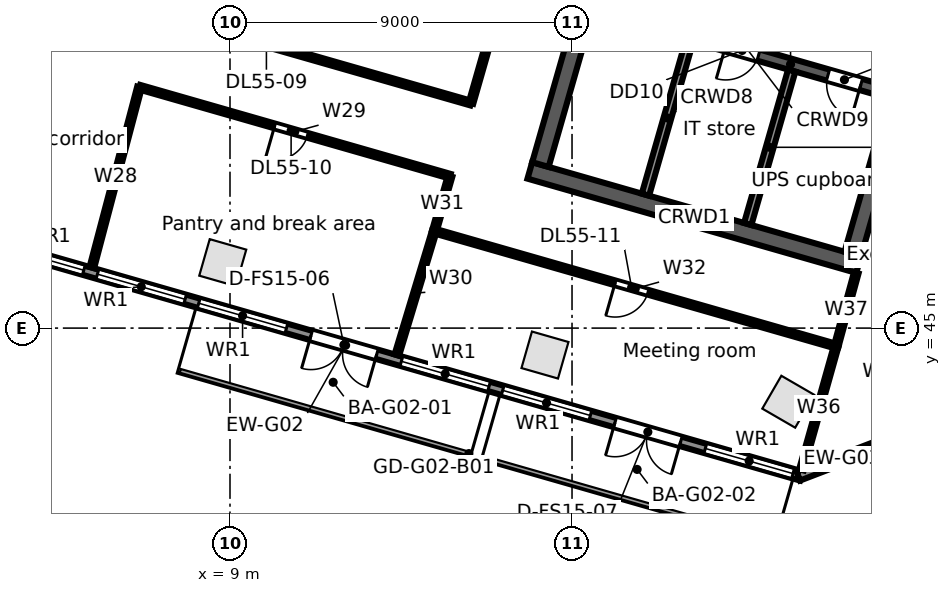
"""IFC4 building model, lengths in metres.
Left out: names, types, materials, properties, quantities, classifications, styles, units other than length and angle.
Written with IfcOpenShell. Run it as: python <this file> out.ifc"""

import sys

from ifc_helpers import new_model, si_unit, direction, frame, frame_2d, origin, origin_2d, place, context, subcontext, project, spatial, rectangle, extrude, element, fill, save


model = new_model("IFC4")
c1 = context("Model", 3, precision=1e-05, world=origin(), true_north=direction((0.0, 1.0)))
c2 = subcontext(c1, "Body", "Model", "MODEL_VIEW")
j1 = project(units=[si_unit("LENGTHUNIT", "METRE"), si_unit("PLANEANGLEUNIT", "RADIAN")], contexts=[c1])
p1 = place(None, origin())
s1 = spatial("IfcSite", under=j1, at=p1, CompositionType="ELEMENT")
p2 = place(p1, origin())
s2 = spatial("IfcBuilding", under=s1, at=p2, CompositionType="ELEMENT")
p3 = place(p2, frame((0.0, 0.0, 254.3)))
s3 = spatial("IfcBuildingStorey", under=s2, at=p3, CompositionType="ELEMENT", Elevation=254.3)
for number, where, z_axis, x_axis in (
    (1, (8.81, 46.722, 0.0), (0.0, 0.0, 1.0), (0.961, -0.276, 0.0)),
    (2, (17.288, 44.291, 0.0), (0.0, 0.0, 1.0), (0.961, -0.276, 0.0)),
    (3, (23.69, 43.063, 0.0), (0.0, 0.0, 1.0), (-0.865, 0.501, 0.0)),
):
    element("IfcColumn", number, at=place(p3, frame(where, z_axis=z_axis, x_axis=x_axis)), inside=s3, PredefinedType="COLUMN", context=c2, shape_type="SweptSolid", body=[
        extrude(rectangle(XDim=1.0, YDim=1.0, at=origin_2d()), origin(), (0.0, 0.0, 1.0), 3.9),
    ])
p4 = place(p3, frame((24.034, 41.108, 0.0), z_axis=(0.0, 0.0, 1.0), x_axis=(-0.96126060691, 0.275641153683, 0.0)))
e4 = element("IfcWall", 4, at=p4, inside=s3, PredefinedType="STANDARD", context=c2, shape_type="SweptSolid", body=[
    extrude(rectangle(XDim=24.951, YDim=0.25, at=frame_2d((12.475, 0.0))), origin(), (0.0, 0.0, 1.0), 3.55),
])
p5 = place(p4, frame((22.416, 0.0, 0.8)))
e5 = element("IfcOpeningElement", 5, at=p5, cuts=e4, PredefinedType="OPENING", context=c2, shape_type="SweptSolid", body=[
    extrude(rectangle(XDim=2.4, YDim=2.2, at=frame_2d((1.2, 1.1))), frame((0.0, 0.135, 0.0), z_axis=(0.0, -1.0, 0.0), x_axis=(1.0, 0.0, 0.0)), (0.0, 0.0, 1.0), 0.27),
])
p6 = place(p4, frame((19.643, 0.0, 0.8)))
e6 = element("IfcOpeningElement", 6, at=p6, cuts=e4, PredefinedType="OPENING", context=c2, shape_type="SweptSolid", body=[
    extrude(rectangle(XDim=2.4, YDim=2.2, at=frame_2d((1.2, 1.1))), frame((0.0, 0.135, 0.0), z_axis=(0.0, -1.0, 0.0), x_axis=(1.0, 0.0, 0.0)), (0.0, 0.0, 1.0), 0.27),
])
p7 = place(p4, frame((16.869, 0.0, 0.8)))
e7 = element("IfcOpeningElement", 7, at=p7, cuts=e4, PredefinedType="OPENING", context=c2, shape_type="SweptSolid", body=[
    extrude(rectangle(XDim=2.4, YDim=2.2, at=frame_2d((1.2, 1.1))), frame((0.0, 0.135, 0.0), z_axis=(0.0, -1.0, 0.0), x_axis=(1.0, 0.0, 0.0)), (0.0, 0.0, 1.0), 0.27),
])
p8 = place(p4, frame((14.096, 0.0, 0.8)))
e8 = element("IfcOpeningElement", 8, at=p8, cuts=e4, PredefinedType="OPENING", context=c2, shape_type="SweptSolid", body=[
    extrude(rectangle(XDim=2.4, YDim=2.2, at=frame_2d((1.2, 1.1))), frame((0.0, 0.135, 0.0), z_axis=(0.0, -1.0, 0.0), x_axis=(1.0, 0.0, 0.0)), (0.0, 0.0, 1.0), 0.27),
])
p9 = place(p4, frame((11.622, 0.0, 0.0)))
e9 = element("IfcOpeningElement", 9, at=p9, cuts=e4, PredefinedType="OPENING", context=c2, shape_type="SweptSolid", body=[
    extrude(rectangle(XDim=1.8, YDim=2.4, at=frame_2d((0.9, 1.2))), frame((0.0, 0.135, 0.0), z_axis=(0.0, -1.0, 0.0), x_axis=(1.0, 0.0, 0.0)), (0.0, 0.0, 1.0), 0.27),
])
p10 = place(p4, frame((8.549, 0.0, 0.8)))
e10 = element("IfcOpeningElement", 10, at=p10, cuts=e4, PredefinedType="OPENING", context=c2, shape_type="SweptSolid", body=[
    extrude(rectangle(XDim=2.4, YDim=2.2, at=frame_2d((1.2, 1.1))), frame((0.0, 0.135, 0.0), z_axis=(0.0, -1.0, 0.0), x_axis=(1.0, 0.0, 0.0)), (0.0, 0.0, 1.0), 0.27),
])
p11 = place(p4, frame((5.775, 0.0, 0.8)))
e11 = element("IfcOpeningElement", 11, at=p11, cuts=e4, PredefinedType="OPENING", context=c2, shape_type="SweptSolid", body=[
    extrude(rectangle(XDim=2.4, YDim=2.2, at=frame_2d((1.2, 1.1))), frame((0.0, 0.135, 0.0), z_axis=(0.0, -1.0, 0.0), x_axis=(1.0, 0.0, 0.0)), (0.0, 0.0, 1.0), 0.27),
])
p12 = place(p4, frame((3.302, 0.0, 0.0)))
e12 = element("IfcOpeningElement", 12, at=p12, cuts=e4, PredefinedType="OPENING", context=c2, shape_type="SweptSolid", body=[
    extrude(rectangle(XDim=1.8, YDim=2.4, at=frame_2d((0.9, 1.2))), frame((0.0, 0.135, 0.0), z_axis=(0.0, -1.0, 0.0), x_axis=(1.0, 0.0, 0.0)), (0.0, 0.0, 1.0), 0.27),
])
p13 = place(p4, frame((0.229, 0.0, 0.8)))
e13 = element("IfcOpeningElement", 13, at=p13, cuts=e4, PredefinedType="OPENING", context=c2, shape_type="SweptSolid", body=[
    extrude(rectangle(XDim=2.4, YDim=2.2, at=frame_2d((1.2, 1.1))), frame((0.0, 0.135, 0.0), z_axis=(0.0, -1.0, 0.0), x_axis=(1.0, 0.0, 0.0)), (0.0, 0.0, 1.0), 0.27),
])
p14 = place(p3, frame((26.27, 41.993, 0.0), z_axis=(0.0, 0.0, 1.0), x_axis=(-0.933573798066, -0.358385216722, 0.0)))
e14 = element("IfcWall", 14, at=p14, inside=s3, PredefinedType="STANDARD", context=c2, shape_type="SweptSolid", body=[
    extrude(rectangle(XDim=2.48, YDim=0.25, at=frame_2d((1.24, 0.0))), origin(), (0.0, 0.0, 1.0), 3.55),
])
p15 = place(p3, frame((16.89, 49.149, 0.0), z_axis=(0.0, 0.0, 1.0), x_axis=(0.96126248289, -0.275634611374, 0.0)))
e15 = element("IfcWall", 15, at=p15, inside=s3, PredefinedType="SOLIDWALL", context=c2, shape_type="SweptSolid", body=[
    extrude(rectangle(XDim=9.0, YDim=0.45, at=frame_2d((4.5, 0.0))), origin(), (0.0, 0.0, 1.0), 3.55),
])
p16 = place(p3, frame((21.131, 52.692, 0.0), z_axis=(0.0, 0.0, 1.0), x_axis=(0.961261488075, -0.275638080722, 0.0)))
e16 = element("IfcWall", 16, at=p16, inside=s3, PredefinedType="SOLIDWALL", context=c2, shape_type="SweptSolid", body=[
    extrude(rectangle(XDim=5.45, YDim=0.3, at=frame_2d((2.725, 0.0))), origin(), (0.0, 0.0, 1.0), 3.55),
])
p17 = place(p16, frame((0.95, 0.0, 0.0)))
e17 = element("IfcOpeningElement", 17, at=p17, cuts=e16, PredefinedType="OPENING", context=c2, shape_type="SweptSolid", body=[
    extrude(rectangle(XDim=0.9, YDim=2.1, at=frame_2d((0.45, 1.05))), frame((0.0, 0.16, 0.0), z_axis=(0.0, -1.0, 0.0), x_axis=(1.0, 0.0, 0.0)), (0.0, 0.0, 1.0), 0.32),
])
p18 = place(p16, frame((3.75, 0.0, 0.0)))
e18 = element("IfcOpeningElement", 18, at=p18, cuts=e16, PredefinedType="OPENING", context=c2, shape_type="SweptSolid", body=[
    extrude(rectangle(XDim=0.9, YDim=2.1, at=frame_2d((0.45, 1.05))), frame((0.0, 0.16, 0.0), z_axis=(0.0, -1.0, 0.0), x_axis=(1.0, 0.0, 0.0)), (0.0, 0.0, 1.0), 0.32),
])
p19 = place(p3, frame((17.168, 49.303, 0.0), z_axis=(0.0, 0.0, 1.0), x_axis=(0.275638974822, 0.961261231695, 0.0)))
e19 = element("IfcWall", 19, at=p19, inside=s3, PredefinedType="SOLIDWALL", context=c2, shape_type="SweptSolid", body=[
    extrude(rectangle(XDim=11.1, YDim=0.45, at=frame_2d((5.55, 0.0))), origin(), (0.0, 0.0, 1.0), 3.55),
])
p20 = place(p19, frame((4.95, 0.0, 0.0)))
e20 = element("IfcOpeningElement", 20, at=p20, cuts=e19, PredefinedType="OPENING", context=c2, shape_type="SweptSolid", body=[
    extrude(rectangle(XDim=1.2, YDim=2.1, at=frame_2d((0.6, 1.05))), frame((0.0, 0.235, 0.0), z_axis=(0.0, -1.0, 0.0), x_axis=(1.0, 0.0, 0.0)), (0.0, 0.0, 1.0), 0.47),
])
p21 = place(p3, frame((19.932, 48.511, 0.0), z_axis=(0.0, 0.0, 1.0), x_axis=(0.275642273411, 0.961260285827, 0.0)))
e21 = element("IfcWall", 21, at=p21, inside=s3, PredefinedType="SOLIDWALL", context=c2, shape_type="SweptSolid", body=[
    extrude(rectangle(XDim=4.2, YDim=0.2, at=frame_2d((2.1, 0.0))), origin(), (0.0, 0.0, 1.0), 3.55),
])
p22 = place(p3, frame((22.623, 47.739, 0.0), z_axis=(0.0, 0.0, 1.0), x_axis=(0.275642273411, 0.961260285827, 0.0)))
e22 = element("IfcWall", 22, at=p22, inside=s3, PredefinedType="PARTITIONING", context=c2, shape_type="SweptSolid", body=[
    extrude(rectangle(XDim=4.2, YDim=0.2, at=frame_2d((2.1, 0.0))), origin(), (0.0, 0.0, 1.0), 3.55),
])
p23 = place(p3, frame((25.387, 46.947, 0.0), z_axis=(0.0, 0.0, 1.0), x_axis=(0.275638974822, 0.961261231695, 0.0)))
e23 = element("IfcWall", 23, at=p23, inside=s3, PredefinedType="SOLIDWALL", context=c2, shape_type="SweptSolid", body=[
    extrude(rectangle(XDim=11.1, YDim=0.45, at=frame_2d((5.55, 0.0))), origin(), (0.0, 0.0, 1.0), 3.55),
])
p24 = place(p23, frame((4.95, 0.0, 0.0)))
e24 = element("IfcOpeningElement", 24, at=p24, cuts=e23, PredefinedType="OPENING", context=c2, shape_type="SweptSolid", body=[
    extrude(rectangle(XDim=1.2, YDim=2.1, at=frame_2d((0.6, 1.05))), frame((0.0, 0.235, 0.0), z_axis=(0.0, -1.0, 0.0), x_axis=(1.0, 0.0, 0.0)), (0.0, 0.0, 1.0), 0.47),
])
p25 = place(p3, frame((4.527, 54.02, 0.0), z_axis=(0.0, 0.0, 1.0), x_axis=(0.961279520283, -0.275575187352, 0.0)))
e25 = element("IfcWall", 25, at=p25, inside=s3, PredefinedType="PARTITIONING", context=c2, shape_type="SweptSolid", body=[
    extrude(rectangle(XDim=11.25, YDim=0.125, at=frame_2d((5.625, 0.0))), origin(), (0.0, 0.0, 1.0), 2.618),
])
p26 = place(p25, frame((5.2, 0.0, 0.0)))
e26 = element("IfcOpeningElement", 26, at=p26, cuts=e25, PredefinedType="OPENING", context=c2, shape_type="SweptSolid", body=[
    extrude(rectangle(XDim=0.9, YDim=2.1, at=frame_2d((0.45, 1.05))), frame((0.0, 0.073, 0.0), z_axis=(0.0, -1.0, 0.0), x_axis=(1.0, 0.0, 0.0)), (0.0, 0.0, 1.0), 0.145),
])
p27 = place(p3, frame((5.364, 46.592, 0.0), z_axis=(0.0, 0.0, 1.0), x_axis=(0.255520885185, 0.966803536006, 0.0)))
e27 = element("IfcWall", 27, at=p27, inside=s3, PredefinedType="PARTITIONING", context=c2, shape_type="SweptSolid", body=[
    extrude(rectangle(XDim=4.911, YDim=0.125, at=frame_2d((2.456, 0.0))), origin(), (0.0, 0.0, 1.0), 2.73),
])
p28 = place(p3, frame((6.619, 51.34, 0.0), z_axis=(0.0, 0.0, 1.0), x_axis=(0.961262314742, -0.275635197782, 0.0)))
e28 = element("IfcWall", 28, at=p28, inside=s3, PredefinedType="PARTITIONING", context=c2, shape_type="SweptSolid", body=[
    extrude(rectangle(XDim=8.5, YDim=0.125, at=frame_2d((4.25, 0.0))), origin(), (0.0, 0.0, 1.0), 2.618),
])
p29 = place(p28, frame((3.7, 0.0, 0.0)))
e29 = element("IfcOpeningElement", 29, at=p29, cuts=e28, PredefinedType="OPENING", context=c2, shape_type="SweptSolid", body=[
    extrude(rectangle(XDim=0.9, YDim=2.1, at=frame_2d((0.45, 1.05))), frame((0.0, 0.073, 0.0), z_axis=(0.0, -1.0, 0.0), x_axis=(1.0, 0.0, 0.0)), (0.0, 0.0, 1.0), 0.145),
])
p30 = place(p3, frame((13.39, 44.29, 0.0), z_axis=(0.0, 0.0, 1.0), x_axis=(0.289389501276, 0.957211427299, 0.0)))
e30 = element("IfcWall", 30, at=p30, inside=s3, PredefinedType="PARTITIONING", context=c2, shape_type="SweptSolid", body=[
    extrude(rectangle(XDim=3.411, YDim=0.125, at=frame_2d((1.706, 0.0))), origin(), (0.0, 0.0, 1.0), 2.73),
])
p31 = place(p3, frame((14.377, 47.555, 0.0), z_axis=(0.0, 0.0, 1.0), x_axis=(0.275365908, 0.961339490873, 0.0)))
e31 = element("IfcWall", 31, at=p31, inside=s3, PredefinedType="PARTITIONING", context=c2, shape_type="SweptSolid", body=[
    extrude(rectangle(XDim=1.5, YDim=0.125, at=frame_2d((0.75, 0.0))), origin(), (0.0, 0.0, 1.0), 3.55),
])
p32 = place(p3, frame((14.377, 47.555, 0.0), z_axis=(0.0, 0.0, 1.0), x_axis=(0.961263044958, -0.275632651182, 0.0)))
e32 = element("IfcWall", 32, at=p32, inside=s3, PredefinedType="PARTITIONING", context=c2, shape_type="SweptSolid", body=[
    extrude(rectangle(XDim=11.0, YDim=0.125, at=frame_2d((5.5, 0.0))), origin(), (0.0, 0.0, 1.0), 2.73),
])
p33 = place(p32, frame((4.95, 0.0, 0.0)))
e33 = element("IfcOpeningElement", 33, at=p33, cuts=e32, PredefinedType="OPENING", context=c2, shape_type="SweptSolid", body=[
    extrude(rectangle(XDim=0.9, YDim=2.1, at=frame_2d((0.45, 1.05))), frame((0.0, 0.073, 0.0), z_axis=(0.0, -1.0, 0.0), x_axis=(1.0, 0.0, 0.0)), (0.0, 0.0, 1.0), 0.145),
])
p34 = place(p3, frame((15.341, 50.92, 0.0), z_axis=(0.0, 0.0, 1.0), x_axis=(0.275653309838, 0.961257121053, 0.0)))
e34 = element("IfcWall", 34, at=p34, inside=s3, PredefinedType="PARTITIONING", context=c2, shape_type="SweptSolid", body=[
    extrude(rectangle(XDim=5.499, YDim=0.125, at=frame_2d((2.75, 0.0))), origin(), (0.0, 0.0, 1.0), 2.618),
])
p35 = place(p3, frame((24.036, 41.27, 0.0), z_axis=(0.0, 0.0, 1.0), x_axis=(0.270787421954, 0.962639170256, 0.0)))
e35 = element("IfcWall", 35, at=p35, inside=s3, PredefinedType="PARTITIONING", context=c2, shape_type="SweptSolid", body=[
    extrude(rectangle(XDim=3.379, YDim=0.125, at=frame_2d((1.689, 0.0))), origin(), (0.0, 0.0, 1.0), 3.55),
])
p36 = place(p3, frame((24.951, 44.523, 0.0), z_axis=(0.0, 0.0, 1.0), x_axis=(0.264046927145, 0.964509834198, 0.0)))
e36 = element("IfcWall", 36, at=p36, inside=s3, PredefinedType="PARTITIONING", context=c2, shape_type="SweptSolid", body=[
    extrude(rectangle(XDim=2.0, YDim=0.125, at=frame_2d((1.0, 0.0))), origin(), (0.0, 0.0, 1.0), 2.73),
])
p37 = place(p6, origin())
e37 = element("IfcWindow", 37, at=p37, inside=s3, PartitioningType="SINGLE_PANEL", PredefinedType="WINDOW", context=c2, shape_type="SweptSolid", body=[
    extrude(rectangle(XDim=2.4, YDim=2.2, at=frame_2d((1.2, 1.1))), frame((0.0, 0.03, 0.0), z_axis=(0.0, -1.0, 0.0), x_axis=(1.0, 0.0, 0.0)), (0.0, 0.0, 1.0), 0.06),
])
fill(e6, e37)
p38 = place(p7, origin())
e38 = element("IfcWindow", 38, at=p38, inside=s3, PartitioningType="SINGLE_PANEL", PredefinedType="WINDOW", context=c2, shape_type="SweptSolid", body=[
    extrude(rectangle(XDim=2.4, YDim=2.2, at=frame_2d((1.2, 1.1))), frame((0.0, 0.03, 0.0), z_axis=(0.0, -1.0, 0.0), x_axis=(1.0, 0.0, 0.0)), (0.0, 0.0, 1.0), 0.06),
])
fill(e7, e38)
p39 = place(p8, origin())
e39 = element("IfcWindow", 39, at=p39, inside=s3, PartitioningType="SINGLE_PANEL", PredefinedType="WINDOW", context=c2, shape_type="SweptSolid", body=[
    extrude(rectangle(XDim=2.4, YDim=2.2, at=frame_2d((1.2, 1.1))), frame((0.0, 0.03, 0.0), z_axis=(0.0, -1.0, 0.0), x_axis=(1.0, 0.0, 0.0)), (0.0, 0.0, 1.0), 0.06),
])
fill(e8, e39)
p40 = place(p9, origin())
e40 = element("IfcDoor", 40, at=p40, inside=s3, OperationType="DOUBLE_DOOR_SINGLE_SWING", PredefinedType="DOOR", context=c2, shape_type="SweptSolid", body=[
    extrude(rectangle(XDim=1.8, YDim=2.4, at=frame_2d((0.9, 1.2))), frame((0.0, 0.025, 0.0), z_axis=(0.0, -1.0, 0.0), x_axis=(1.0, 0.0, 0.0)), (0.0, 0.0, 1.0), 0.05),
])
fill(e9, e40)
p41 = place(p10, origin())
e41 = element("IfcWindow", 41, at=p41, inside=s3, PartitioningType="SINGLE_PANEL", PredefinedType="WINDOW", context=c2, shape_type="SweptSolid", body=[
    extrude(rectangle(XDim=2.4, YDim=2.2, at=frame_2d((1.2, 1.1))), frame((0.0, 0.03, 0.0), z_axis=(0.0, -1.0, 0.0), x_axis=(1.0, 0.0, 0.0)), (0.0, 0.0, 1.0), 0.06),
])
fill(e10, e41)
p42 = place(p11, origin())
e42 = element("IfcWindow", 42, at=p42, inside=s3, PartitioningType="SINGLE_PANEL", PredefinedType="WINDOW", context=c2, shape_type="SweptSolid", body=[
    extrude(rectangle(XDim=2.4, YDim=2.2, at=frame_2d((1.2, 1.1))), frame((0.0, 0.03, 0.0), z_axis=(0.0, -1.0, 0.0), x_axis=(1.0, 0.0, 0.0)), (0.0, 0.0, 1.0), 0.06),
])
fill(e11, e42)
p43 = place(p12, origin())
e43 = element("IfcDoor", 43, at=p43, inside=s3, OperationType="DOUBLE_DOOR_SINGLE_SWING", PredefinedType="DOOR", context=c2, shape_type="SweptSolid", body=[
    extrude(rectangle(XDim=1.8, YDim=2.4, at=frame_2d((0.9, 1.2))), frame((0.0, 0.025, 0.0), z_axis=(0.0, -1.0, 0.0), x_axis=(1.0, 0.0, 0.0)), (0.0, 0.0, 1.0), 0.05),
])
fill(e12, e43)
p44 = place(p13, origin())
e44 = element("IfcWindow", 44, at=p44, inside=s3, PartitioningType="SINGLE_PANEL", PredefinedType="WINDOW", context=c2, shape_type="SweptSolid", body=[
    extrude(rectangle(XDim=2.4, YDim=2.2, at=frame_2d((1.2, 1.1))), frame((0.0, 0.03, 0.0), z_axis=(0.0, -1.0, 0.0), x_axis=(1.0, 0.0, 0.0)), (0.0, 0.0, 1.0), 0.06),
])
fill(e13, e44)
p45 = place(p17, frame((0.9, 0.0, 0.0), z_axis=(0.0, 0.0, 1.0), x_axis=(-1.0, 0.0, 0.0)))
e45 = element("IfcDoor", 45, at=p45, inside=s3, OperationType="SINGLE_SWING_RIGHT", PredefinedType="DOOR", context=c2, shape_type="SweptSolid", body=[
    extrude(rectangle(XDim=0.9, YDim=2.1, at=frame_2d((0.45, 1.05))), frame((0.0, 0.025, 0.0), z_axis=(0.0, -1.0, 0.0), x_axis=(1.0, 0.0, 0.0)), (0.0, 0.0, 1.0), 0.05),
])
fill(e17, e45)
p46 = place(p18, frame((0.9, 0.0, 0.0), z_axis=(0.0, 0.0, 1.0), x_axis=(-1.0, 0.0, 0.0)))
e46 = element("IfcDoor", 46, at=p46, inside=s3, OperationType="SINGLE_SWING_LEFT", PredefinedType="DOOR", context=c2, shape_type="SweptSolid", body=[
    extrude(rectangle(XDim=0.9, YDim=2.1, at=frame_2d((0.45, 1.05))), frame((0.0, 0.025, 0.0), z_axis=(0.0, -1.0, 0.0), x_axis=(1.0, 0.0, 0.0)), (0.0, 0.0, 1.0), 0.05),
])
fill(e18, e46)
p47 = place(p29, frame((0.9, 0.0, 0.0), z_axis=(0.0, 0.0, 1.0), x_axis=(-1.0, 0.0, 0.0)))
e47 = element("IfcDoor", 47, at=p47, inside=s3, OperationType="SINGLE_SWING_RIGHT", PredefinedType="DOOR", context=c2, shape_type="SweptSolid", body=[
    extrude(rectangle(XDim=0.9, YDim=2.1, at=frame_2d((0.45, 1.05))), frame((0.0, 0.025, 0.0), z_axis=(0.0, -1.0, 0.0), x_axis=(1.0, 0.0, 0.0)), (0.0, 0.0, 1.0), 0.05),
])
fill(e29, e47)
p48 = place(p33, frame((0.9, 0.0, 0.0), z_axis=(0.0, 0.0, 1.0), x_axis=(-1.0, 0.0, 0.0)))
e48 = element("IfcDoor", 48, at=p48, inside=s3, OperationType="SINGLE_SWING_RIGHT", PredefinedType="DOOR", context=c2, shape_type="SweptSolid", body=[
    extrude(rectangle(XDim=0.9, YDim=2.1, at=frame_2d((0.45, 1.05))), frame((0.0, 0.025, 0.0), z_axis=(0.0, -1.0, 0.0), x_axis=(1.0, 0.0, 0.0)), (0.0, 0.0, 1.0), 0.05),
])
fill(e33, e48)
save(model, sys.argv[1])
